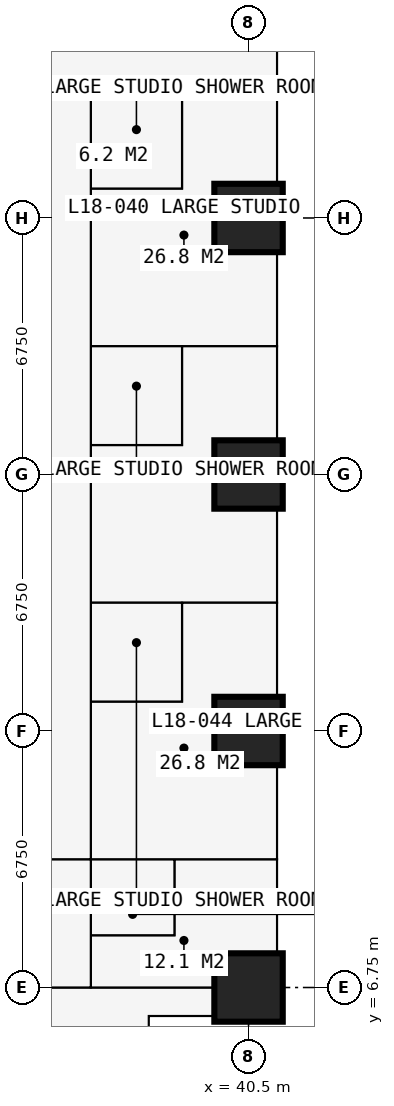
"""IFC4 building model, lengths in metres.
Left out: names, types, materials, properties, quantities, classifications, styles, units other than length and angle.
Written with IfcOpenShell. Run it as: python <this file> out.ifc"""

import sys

from ifc_helpers import new_model, si_unit, direction, frame, frame_2d, origin, origin_2d, place, context, subcontext, project, spatial, rectangle, extrude, element, fill, save


model = new_model("IFC4")
c1 = context("Model", 3, precision=1e-05, world=origin(), true_north=direction((0.0, 1.0)))
c2 = subcontext(c1, "Body", "Model", "MODEL_VIEW")
j1 = project(units=[si_unit("LENGTHUNIT", "METRE"), si_unit("PLANEANGLEUNIT", "RADIAN")], contexts=[c1])
p1 = place(None, origin())
s1 = spatial("IfcSite", under=j1, at=p1, CompositionType="ELEMENT")
p2 = place(p1, origin())
s2 = spatial("IfcBuilding", under=s1, at=p2, CompositionType="ELEMENT")
p3 = place(p2, frame((0.0, 0.0, 68.4)))
s3 = spatial("IfcBuildingStorey", under=s2, at=p3, CompositionType="ELEMENT", Elevation=68.4)
for number, where, z_axis, x_axis in (
    (1, (40.5, 6.75, 0.0), (0.0, 0.0, 1.0), (1.0, 0.0, 0.0)),
    (2, (40.5, 13.5, 0.0), (0.0, 0.0, 1.0), (1.0, 0.0, 0.0)),
    (3, (40.5, 20.25, 0.0), (0.0, 0.0, 1.0), (1.0, 0.0, 0.0)),
    (4, (40.5, 27.0, 0.0), (0.0, 0.0, 1.0), (1.0, 0.0, 0.0)),
):
    element("IfcColumn", number, at=place(p3, frame(where, z_axis=z_axis, x_axis=x_axis)), inside=s3, PredefinedType="COLUMN", context=c2, shape_type="SweptSolid", body=[
        extrude(rectangle(XDim=1.8, YDim=1.8, at=origin_2d()), origin(), (0.0, 0.0, 1.0), 3.6),
    ])
p4 = place(p3, frame((41.25, 20.25, 0.0), z_axis=(0.0, 0.0, 1.0), x_axis=(0.0, -1.0, 0.0)))
e5 = element("IfcWall", 5, at=p4, inside=s3, PredefinedType="SOLIDWALL", context=c2, shape_type="SweptSolid", body=[
    extrude(rectangle(XDim=6.75, YDim=0.15, at=frame_2d((3.375, 0.0))), origin(), (0.0, 0.0, 1.0), 3.375),
])
p5 = place(p4, frame((0.962, 0.0, 0.0)))
e6 = element("IfcOpeningElement", 6, at=p5, cuts=e5, PredefinedType="OPENING", context=c2, shape_type="SweptSolid", body=[
    extrude(rectangle(XDim=1.0, YDim=2.2, at=frame_2d((0.5, 1.1))), frame((0.0, 0.085, 0.0), z_axis=(0.0, -1.0, 0.0), x_axis=(1.0, 0.0, 0.0)), (0.0, 0.0, 1.0), 0.17),
])
p6 = place(p4, frame((2.025, 0.0, 0.9)))
e7 = element("IfcOpeningElement", 7, at=p6, cuts=e5, PredefinedType="OPENING", context=c2, shape_type="SweptSolid", body=[
    extrude(rectangle(XDim=1.2, YDim=1.8, at=frame_2d((0.6, 0.9))), frame((0.0, 0.085, 0.0), z_axis=(0.0, -1.0, 0.0), x_axis=(1.0, 0.0, 0.0)), (0.0, 0.0, 1.0), 0.17),
])
p7 = place(p4, frame((4.788, 0.0, 0.0)))
e8 = element("IfcOpeningElement", 8, at=p7, cuts=e5, PredefinedType="OPENING", context=c2, shape_type="SweptSolid", body=[
    extrude(rectangle(XDim=1.0, YDim=2.2, at=frame_2d((0.5, 1.1))), frame((0.0, 0.085, 0.0), z_axis=(0.0, -1.0, 0.0), x_axis=(1.0, 0.0, 0.0)), (0.0, 0.0, 1.0), 0.17),
])
p8 = place(p4, frame((3.525, 0.0, 0.9)))
e9 = element("IfcOpeningElement", 9, at=p8, cuts=e5, PredefinedType="OPENING", context=c2, shape_type="SweptSolid", body=[
    extrude(rectangle(XDim=1.2, YDim=1.8, at=frame_2d((0.6, 0.9))), frame((0.0, 0.085, 0.0), z_axis=(0.0, -1.0, 0.0), x_axis=(1.0, 0.0, 0.0)), (0.0, 0.0, 1.0), 0.17),
])
p9 = place(p3, frame((37.875, 2.625, 0.0), z_axis=(0.0, 0.0, 1.0), x_axis=(0.0, 1.0, 0.0)))
e10 = element("IfcWall", 10, at=p9, inside=s3, PredefinedType="SOLIDWALL", context=c2, shape_type="SweptSolid", body=[
    extrude(rectangle(XDim=3.375, YDim=0.3, at=frame_2d((1.688, 0.0))), origin(), (0.0, 0.0, 1.0), 3.375),
])
p10 = place(p9, frame((0.788, 0.0, 0.6)))
e11 = element("IfcOpeningElement", 11, at=p10, cuts=e10, PredefinedType="OPENING", context=c2, shape_type="SweptSolid", body=[
    extrude(rectangle(XDim=1.8, YDim=2.1, at=frame_2d((0.9, 1.05))), frame((0.0, 0.16, 0.0), z_axis=(0.0, -1.0, 0.0), x_axis=(1.0, 0.0, 0.0)), (0.0, 0.0, 1.0), 0.32),
])
p11 = place(p3, frame((37.875, 6.0, 0.0), z_axis=(0.0, 0.0, 1.0), x_axis=(1.0, 0.0, 0.0)))
e12 = element("IfcWall", 12, at=p11, inside=s3, PredefinedType="SOLIDWALL", context=c2, shape_type="SweptSolid", body=[
    extrude(rectangle(XDim=3.375, YDim=0.3, at=frame_2d((1.688, 0.0))), origin(), (0.0, 0.0, 1.0), 3.375),
])
p12 = place(p11, frame((0.343, 0.0, 0.9)))
e13 = element("IfcOpeningElement", 13, at=p12, cuts=e12, PredefinedType="OPENING", context=c2, shape_type="SweptSolid", body=[
    extrude(rectangle(XDim=1.2, YDim=1.8, at=frame_2d((0.6, 0.9))), frame((0.0, 0.16, 0.0), z_axis=(0.0, -1.0, 0.0), x_axis=(1.0, 0.0, 0.0)), (0.0, 0.0, 1.0), 0.32),
])
p13 = place(p3, frame((41.35, 16.875, 0.0), z_axis=(0.0, 0.0, 1.0), x_axis=(1.0, 0.0, 0.0)))
e14 = element("IfcWall", 14, at=p13, inside=s3, PredefinedType="USERDEFINED", context=c2, shape_type="SweptSolid", body=[
    extrude(rectangle(XDim=2.2, YDim=1.0, at=frame_2d((1.1, 0.0))), origin(), (0.0, 0.0, 1.0), 0.9),
])
p14 = place(p3, frame((30.375, 6.75, 0.0), z_axis=(0.0, 0.0, 1.0), x_axis=(1.0, 0.0, 0.0)))
e15 = element("IfcWall", 15, at=p14, inside=s3, PredefinedType="PARTITIONING", context=c2, shape_type="SweptSolid", body=[
    extrude(rectangle(XDim=10.859, YDim=0.15, at=frame_2d((5.429, 0.0))), origin(), (0.0, 0.0, 1.0), 2.877),
])
p15 = place(p14, frame((1.45, 0.0, 0.0)))
e16 = element("IfcOpeningElement", 16, at=p15, cuts=e15, PredefinedType="OPENING", context=c2, shape_type="SweptSolid", body=[
    extrude(rectangle(XDim=1.0, YDim=2.2, at=frame_2d((0.5, 1.1))), frame((0.0, 0.085, 0.0), z_axis=(0.0, -1.0, 0.0), x_axis=(1.0, 0.0, 0.0)), (0.0, 0.0, 1.0), 0.17),
])
p16 = place(p3, frame((30.375, 10.125, 0.0), z_axis=(0.0, 0.0, 1.0), x_axis=(1.0, 0.0, 0.0)))
e17 = element("IfcWall", 17, at=p16, inside=s3, PredefinedType="PARTITIONING", context=c2, shape_type="SweptSolid", body=[
    extrude(rectangle(XDim=10.859, YDim=0.15, at=frame_2d((5.429, 0.0))), origin(), (0.0, 0.0, 1.0), 3.375),
])
p17 = place(p16, frame((2.5, 0.0, 0.0)))
e18 = element("IfcOpeningElement", 18, at=p17, cuts=e17, PredefinedType="OPENING", context=c2, shape_type="SweptSolid", body=[
    extrude(rectangle(XDim=1.0, YDim=2.2, at=frame_2d((0.5, 1.1))), frame((0.0, 0.085, 0.0), z_axis=(0.0, -1.0, 0.0), x_axis=(1.0, 0.0, 0.0)), (0.0, 0.0, 1.0), 0.17),
])
p18 = place(p3, frame((30.375, 30.375, 0.0), z_axis=(0.0, 0.0, 1.0), x_axis=(1.0, 0.0, 0.0)))
e19 = element("IfcWall", 19, at=p18, inside=s3, PredefinedType="PARTITIONING", context=c2, shape_type="SweptSolid", body=[
    extrude(rectangle(XDim=10.859, YDim=0.15, at=frame_2d((5.429, 0.0))), origin(), (0.0, 0.0, 1.0), 3.375),
])
p19 = place(p3, frame((36.35, 6.75, 0.0), z_axis=(0.0, 0.0, 1.0), x_axis=(0.0, 1.0, 0.0)))
e20 = element("IfcWall", 20, at=p19, inside=s3, PredefinedType="PARTITIONING", context=c2, shape_type="SweptSolid", body=[
    extrude(rectangle(XDim=23.625, YDim=0.15, at=frame_2d((11.812, 0.0))), origin(), (0.0, 0.0, 1.0), 3.375),
])
p20 = place(p19, frame((0.2, 0.0, 0.0)))
e21 = element("IfcOpeningElement", 21, at=p20, cuts=e20, PredefinedType="OPENING", context=c2, shape_type="SweptSolid", body=[
    extrude(rectangle(XDim=0.95, YDim=2.2, at=frame_2d((0.475, 1.1))), frame((0.0, 0.085, 0.0), z_axis=(0.0, -1.0, 0.0), x_axis=(1.0, 0.0, 0.0)), (0.0, 0.0, 1.0), 0.17),
])
p21 = place(p19, frame((18.475, 0.0, 0.0)))
e22 = element("IfcOpeningElement", 22, at=p21, cuts=e20, PredefinedType="OPENING", context=c2, shape_type="SweptSolid", body=[
    extrude(rectangle(XDim=0.95, YDim=2.2, at=frame_2d((0.475, 1.1))), frame((0.0, 0.085, 0.0), z_axis=(0.0, -1.0, 0.0), x_axis=(1.0, 0.0, 0.0)), (0.0, 0.0, 1.0), 0.17),
])
p22 = place(p19, frame((11.725, 0.0, 0.0)))
e23 = element("IfcOpeningElement", 23, at=p22, cuts=e20, PredefinedType="OPENING", context=c2, shape_type="SweptSolid", body=[
    extrude(rectangle(XDim=0.95, YDim=2.2, at=frame_2d((0.475, 1.1))), frame((0.0, 0.085, 0.0), z_axis=(0.0, -1.0, 0.0), x_axis=(1.0, 0.0, 0.0)), (0.0, 0.0, 1.0), 0.17),
])
p23 = place(p19, frame((4.975, 0.0, 0.0)))
e24 = element("IfcOpeningElement", 24, at=p23, cuts=e20, PredefinedType="OPENING", context=c2, shape_type="SweptSolid", body=[
    extrude(rectangle(XDim=0.95, YDim=2.2, at=frame_2d((0.475, 1.1))), frame((0.0, 0.085, 0.0), z_axis=(0.0, -1.0, 0.0), x_axis=(1.0, 0.0, 0.0)), (0.0, 0.0, 1.0), 0.17),
])
p24 = place(p3, frame((36.35, 8.125, 0.0), z_axis=(0.0, 0.0, 1.0), x_axis=(1.0, 0.0, 0.0)))
e25 = element("IfcWall", 25, at=p24, inside=s3, PredefinedType="PARTITIONING", context=c2, shape_type="SweptSolid", body=[
    extrude(rectangle(XDim=2.2, YDim=0.1, at=frame_2d((1.1, 0.0))), origin(), (0.0, 0.0, 1.0), 3.375),
])
p25 = place(p24, frame((0.65, 0.0, 0.0)))
e26 = element("IfcOpeningElement", 26, at=p25, cuts=e25, PredefinedType="OPENING", context=c2, shape_type="SweptSolid", body=[
    extrude(rectangle(XDim=0.9, YDim=2.2, at=frame_2d((0.45, 1.1))), frame((0.0, 0.06, 0.0), z_axis=(0.0, -1.0, 0.0), x_axis=(1.0, 0.0, 0.0)), (0.0, 0.0, 1.0), 0.12),
])
p26 = place(p3, frame((36.35, 14.275, 0.0), z_axis=(0.0, 0.0, 1.0), x_axis=(1.0, 0.0, 0.0)))
e27 = element("IfcWall", 27, at=p26, inside=s3, PredefinedType="PARTITIONING", context=c2, shape_type="SweptSolid", body=[
    extrude(rectangle(XDim=2.4, YDim=0.1, at=frame_2d((1.2, 0.0))), origin(), (0.0, 0.0, 1.0), 3.375),
])
p27 = place(p3, frame((36.35, 16.875, 0.0), z_axis=(0.0, 0.0, 1.0), x_axis=(1.0, 0.0, 0.0)))
e28 = element("IfcWall", 28, at=p27, inside=s3, PredefinedType="PARTITIONING", context=c2, shape_type="SweptSolid", body=[
    extrude(rectangle(XDim=4.884, YDim=0.175, at=frame_2d((2.442, 0.0))), origin(), (0.0, 0.0, 1.0), 3.375),
])
p28 = place(p27, frame((0.75, 0.0, 0.0)))
e29 = element("IfcOpeningElement", 29, at=p28, cuts=e28, PredefinedType="OPENING", context=c2, shape_type="SweptSolid", body=[
    extrude(rectangle(XDim=0.9, YDim=2.2, at=frame_2d((0.45, 1.1))), frame((0.0, 0.097, 0.0), z_axis=(0.0, -1.0, 0.0), x_axis=(1.0, 0.0, 0.0)), (0.0, 0.0, 1.0), 0.195),
])
p29 = place(p3, frame((36.35, 21.025, 0.0), z_axis=(0.0, 0.0, 1.0), x_axis=(1.0, 0.0, 0.0)))
e30 = element("IfcWall", 30, at=p29, inside=s3, PredefinedType="PARTITIONING", context=c2, shape_type="SweptSolid", body=[
    extrude(rectangle(XDim=2.4, YDim=0.1, at=frame_2d((1.2, 0.0))), origin(), (0.0, 0.0, 1.0), 3.375),
])
p30 = place(p3, frame((36.35, 23.625, 0.0), z_axis=(0.0, 0.0, 1.0), x_axis=(1.0, 0.0, 0.0)))
e31 = element("IfcWall", 31, at=p30, inside=s3, PredefinedType="PARTITIONING", context=c2, shape_type="SweptSolid", body=[
    extrude(rectangle(XDim=4.884, YDim=0.175, at=frame_2d((2.442, 0.0))), origin(), (0.0, 0.0, 1.0), 3.375),
])
p31 = place(p30, frame((0.75, 0.0, 0.0)))
e32 = element("IfcOpeningElement", 32, at=p31, cuts=e31, PredefinedType="OPENING", context=c2, shape_type="SweptSolid", body=[
    extrude(rectangle(XDim=0.9, YDim=2.2, at=frame_2d((0.45, 1.1))), frame((0.0, 0.097, 0.0), z_axis=(0.0, -1.0, 0.0), x_axis=(1.0, 0.0, 0.0)), (0.0, 0.0, 1.0), 0.195),
])
p32 = place(p3, frame((36.35, 27.775, 0.0), z_axis=(0.0, 0.0, 1.0), x_axis=(1.0, 0.0, 0.0)))
e33 = element("IfcWall", 33, at=p32, inside=s3, PredefinedType="PARTITIONING", context=c2, shape_type="SweptSolid", body=[
    extrude(rectangle(XDim=2.4, YDim=0.1, at=frame_2d((1.2, 0.0))), origin(), (0.0, 0.0, 1.0), 3.375),
])
p33 = place(p3, frame((38.55, 8.125, 0.0), z_axis=(0.0, 0.0, 1.0), x_axis=(0.0, 1.0, 0.0)))
e34 = element("IfcWall", 34, at=p33, inside=s3, PredefinedType="PARTITIONING", context=c2, shape_type="SweptSolid", body=[
    extrude(rectangle(XDim=2.0, YDim=0.1, at=frame_2d((1.0, 0.0))), origin(), (0.0, 0.0, 1.0), 3.375),
])
for number, where, z_axis, x_axis in (
    (35, (38.75, 14.275, 0.0), (0.0, 0.0, 1.0), (0.0, 1.0, 0.0)),
    (36, (38.75, 21.025, 0.0), (0.0, 0.0, 1.0), (0.0, 1.0, 0.0)),
):
    element("IfcWall", number, at=place(p3, frame(where, z_axis=z_axis, x_axis=x_axis)), inside=s3, PredefinedType="PARTITIONING", context=c2, shape_type="SweptSolid", body=[
        extrude(rectangle(XDim=2.6, YDim=0.1, at=frame_2d((1.3, 0.0))), origin(), (0.0, 0.0, 1.0), 3.375),
    ])
p34 = place(p3, frame((38.75, 27.775, 0.0), z_axis=(0.0, 0.0, 1.0), x_axis=(0.0, 1.0, 0.0)))
e37 = element("IfcWall", 37, at=p34, inside=s3, PredefinedType="PARTITIONING", context=c2, shape_type="SweptSolid", body=[
    extrude(rectangle(XDim=2.6, YDim=0.1, at=frame_2d((1.3, 0.0))), origin(), (0.0, 0.0, 1.0), 3.375),
])
p35 = place(p34, frame((0.85, 0.0, 0.0)))
e38 = element("IfcOpeningElement", 38, at=p35, cuts=e37, PredefinedType="OPENING", context=c2, shape_type="SweptSolid", body=[
    extrude(rectangle(XDim=0.9, YDim=2.2, at=frame_2d((0.45, 1.1))), frame((0.0, 0.06, 0.0), z_axis=(0.0, -1.0, 0.0), x_axis=(1.0, 0.0, 0.0)), (0.0, 0.0, 1.0), 0.12),
])
p36 = place(p5, origin())
e39 = element("IfcDoor", 39, at=p36, inside=s3, OperationType="SINGLE_SWING_LEFT", PredefinedType="DOOR", context=c2, shape_type="SweptSolid", body=[
    extrude(rectangle(XDim=1.0, YDim=2.2, at=frame_2d((0.5, 1.1))), frame((0.0, 0.025, 0.0), z_axis=(0.0, -1.0, 0.0), x_axis=(1.0, 0.0, 0.0)), (0.0, 0.0, 1.0), 0.05),
])
fill(e6, e39)
p37 = place(p6, origin())
e40 = element("IfcWindow", 40, at=p37, inside=s3, PartitioningType="SINGLE_PANEL", PredefinedType="WINDOW", context=c2, shape_type="SweptSolid", body=[
    extrude(rectangle(XDim=1.2, YDim=1.8, at=frame_2d((0.6, 0.9))), frame((0.0, 0.03, 0.0), z_axis=(0.0, -1.0, 0.0), x_axis=(1.0, 0.0, 0.0)), (0.0, 0.0, 1.0), 0.06),
])
fill(e7, e40)
p38 = place(p7, origin())
e41 = element("IfcDoor", 41, at=p38, inside=s3, OperationType="SINGLE_SWING_RIGHT", PredefinedType="DOOR", context=c2, shape_type="SweptSolid", body=[
    extrude(rectangle(XDim=1.0, YDim=2.2, at=frame_2d((0.5, 1.1))), frame((0.0, 0.025, 0.0), z_axis=(0.0, -1.0, 0.0), x_axis=(1.0, 0.0, 0.0)), (0.0, 0.0, 1.0), 0.05),
])
fill(e8, e41)
p39 = place(p8, origin())
e42 = element("IfcWindow", 42, at=p39, inside=s3, PartitioningType="SINGLE_PANEL", PredefinedType="WINDOW", context=c2, shape_type="SweptSolid", body=[
    extrude(rectangle(XDim=1.2, YDim=1.8, at=frame_2d((0.6, 0.9))), frame((0.0, 0.03, 0.0), z_axis=(0.0, -1.0, 0.0), x_axis=(1.0, 0.0, 0.0)), (0.0, 0.0, 1.0), 0.06),
])
fill(e9, e42)
p40 = place(p12, origin())
e43 = element("IfcWindow", 43, at=p40, inside=s3, PartitioningType="SINGLE_PANEL", PredefinedType="WINDOW", context=c2, shape_type="SweptSolid", body=[
    extrude(rectangle(XDim=1.2, YDim=1.8, at=frame_2d((0.6, 0.9))), frame((0.0, 0.03, 0.0), z_axis=(0.0, -1.0, 0.0), x_axis=(1.0, 0.0, 0.0)), (0.0, 0.0, 1.0), 0.06),
])
fill(e13, e43)
p41 = place(p20, origin())
e44 = element("IfcDoor", 44, at=p41, inside=s3, OperationType="SINGLE_SWING_LEFT", PredefinedType="DOOR", context=c2, shape_type="SweptSolid", body=[
    extrude(rectangle(XDim=0.95, YDim=2.2, at=frame_2d((0.475, 1.1))), frame((0.0, 0.025, 0.0), z_axis=(0.0, -1.0, 0.0), x_axis=(1.0, 0.0, 0.0)), (0.0, 0.0, 1.0), 0.05),
])
fill(e21, e44)
p42 = place(p25, origin())
e45 = element("IfcDoor", 45, at=p42, inside=s3, OperationType="SINGLE_SWING_RIGHT", PredefinedType="DOOR", context=c2, shape_type="SweptSolid", body=[
    extrude(rectangle(XDim=0.9, YDim=2.2, at=frame_2d((0.45, 1.1))), frame((0.0, 0.025, 0.0), z_axis=(0.0, -1.0, 0.0), x_axis=(1.0, 0.0, 0.0)), (0.0, 0.0, 1.0), 0.05),
])
fill(e26, e45)
p43 = place(p21, origin())
e46 = element("IfcDoor", 46, at=p43, inside=s3, OperationType="SINGLE_SWING_LEFT", PredefinedType="DOOR", context=c2, shape_type="SweptSolid", body=[
    extrude(rectangle(XDim=0.95, YDim=2.2, at=frame_2d((0.475, 1.1))), frame((0.0, 0.025, 0.0), z_axis=(0.0, -1.0, 0.0), x_axis=(1.0, 0.0, 0.0)), (0.0, 0.0, 1.0), 0.05),
])
fill(e22, e46)
p44 = place(p35, origin())
e47 = element("IfcDoor", 47, at=p44, inside=s3, OperationType="SINGLE_SWING_RIGHT", PredefinedType="DOOR", context=c2, shape_type="SweptSolid", body=[
    extrude(rectangle(XDim=0.9, YDim=2.2, at=frame_2d((0.45, 1.1))), frame((0.0, 0.025, 0.0), z_axis=(0.0, -1.0, 0.0), x_axis=(1.0, 0.0, 0.0)), (0.0, 0.0, 1.0), 0.05),
])
fill(e38, e47)
p45 = place(p22, origin())
e48 = element("IfcDoor", 48, at=p45, inside=s3, OperationType="SINGLE_SWING_LEFT", PredefinedType="DOOR", context=c2, shape_type="SweptSolid", body=[
    extrude(rectangle(XDim=0.95, YDim=2.2, at=frame_2d((0.475, 1.1))), frame((0.0, 0.025, 0.0), z_axis=(0.0, -1.0, 0.0), x_axis=(1.0, 0.0, 0.0)), (0.0, 0.0, 1.0), 0.05),
])
fill(e23, e48)
p46 = place(p31, origin())
e49 = element("IfcDoor", 49, at=p46, inside=s3, OperationType="SINGLE_SWING_RIGHT", PredefinedType="DOOR", context=c2, shape_type="SweptSolid", body=[
    extrude(rectangle(XDim=0.9, YDim=2.2, at=frame_2d((0.45, 1.1))), frame((0.0, 0.025, 0.0), z_axis=(0.0, -1.0, 0.0), x_axis=(1.0, 0.0, 0.0)), (0.0, 0.0, 1.0), 0.05),
])
fill(e32, e49)
p47 = place(p23, origin())
e50 = element("IfcDoor", 50, at=p47, inside=s3, OperationType="SINGLE_SWING_LEFT", PredefinedType="DOOR", context=c2, shape_type="SweptSolid", body=[
    extrude(rectangle(XDim=0.95, YDim=2.2, at=frame_2d((0.475, 1.1))), frame((0.0, 0.025, 0.0), z_axis=(0.0, -1.0, 0.0), x_axis=(1.0, 0.0, 0.0)), (0.0, 0.0, 1.0), 0.05),
])
fill(e24, e50)
p48 = place(p28, origin())
e51 = element("IfcDoor", 51, at=p48, inside=s3, OperationType="SINGLE_SWING_RIGHT", PredefinedType="DOOR", context=c2, shape_type="SweptSolid", body=[
    extrude(rectangle(XDim=0.9, YDim=2.2, at=frame_2d((0.45, 1.1))), frame((0.0, 0.025, 0.0), z_axis=(0.0, -1.0, 0.0), x_axis=(1.0, 0.0, 0.0)), (0.0, 0.0, 1.0), 0.05),
])
fill(e29, e51)
save(model, sys.argv[1])
